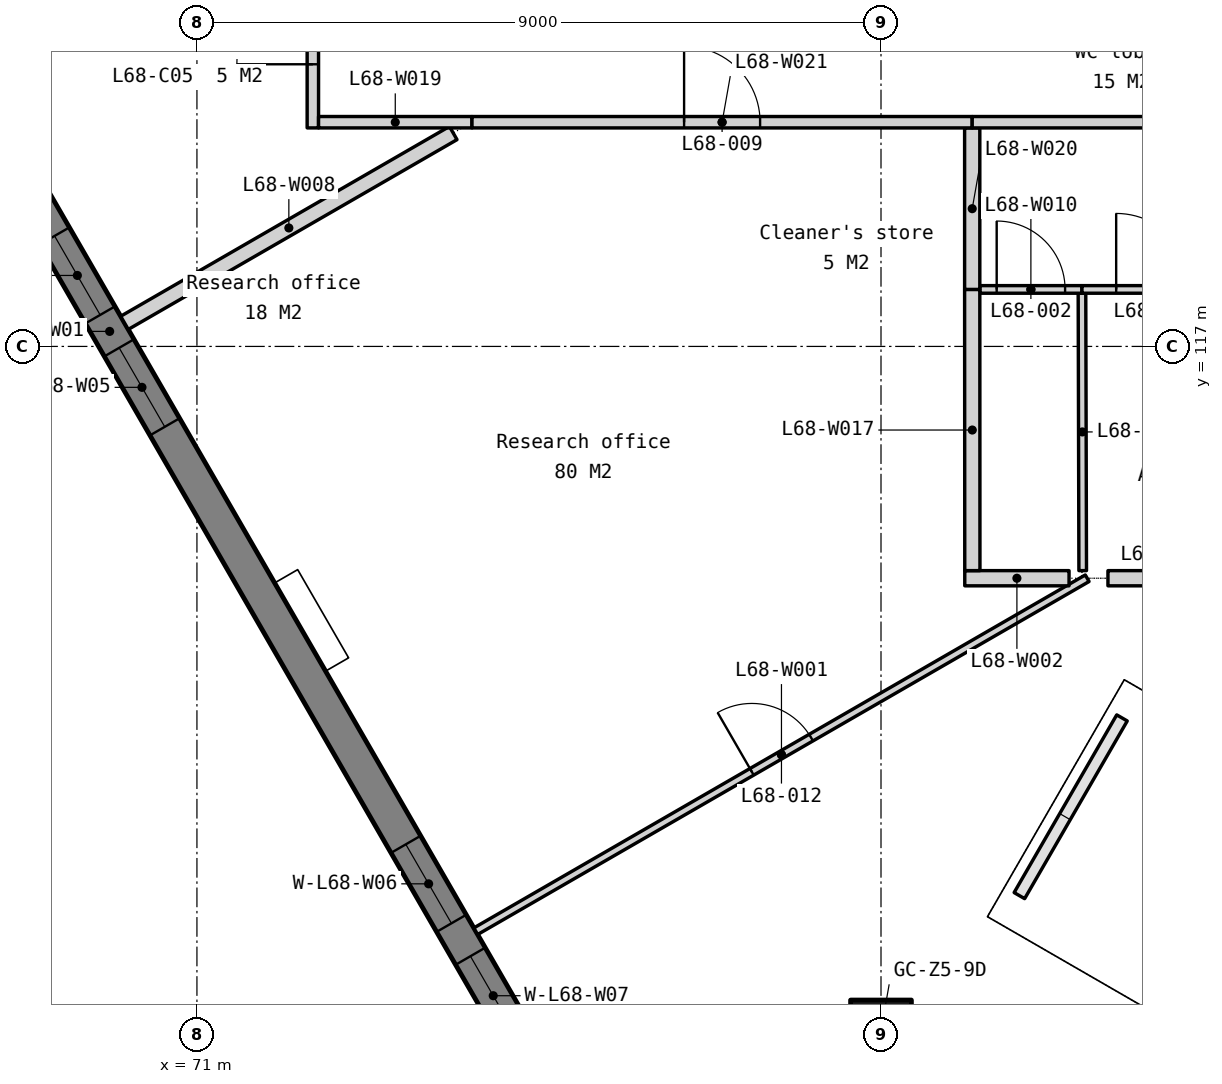
"""IFC4 building model, lengths in metres.
Left out: names, types, materials, properties, quantities, classifications, styles, units other than length and angle.
Written with IfcOpenShell. Run it as: python <this file> out.ifc"""

import sys

from ifc_helpers import new_model, si_unit, direction, frame, frame_2d, origin, origin_2d, place, context, subcontext, project, spatial, polyline, rectangle, outline, extrude, element, fill, save


model = new_model("IFC4")
c1 = context("Model", 3, precision=1e-05, world=origin(), true_north=direction((0.0, 1.0)))
c2 = subcontext(c1, "Body", "Model", "MODEL_VIEW")
j1 = project(units=[si_unit("LENGTHUNIT", "METRE"), si_unit("PLANEANGLEUNIT", "RADIAN")], contexts=[c1])
p1 = place(None, origin())
s1 = spatial("IfcSite", under=j1, at=p1, CompositionType="ELEMENT")
p2 = place(p1, origin())
s2 = spatial("IfcBuilding", under=s1, at=p2, CompositionType="ELEMENT")
p3 = place(p2, frame((0.0, 0.0, 277.7)))
s3 = spatial("IfcBuildingStorey", under=s2, at=p3, CompositionType="ELEMENT", Elevation=277.7)
p4 = place(p3, frame((80.0, 108.0, 0.0), z_axis=(0.0, 0.0, 1.0), x_axis=(1.0, 0.0, 0.0)))
e1 = element("IfcColumn", 1, at=p4, inside=s3, PredefinedType="COLUMN", context=c2, shape_type="SweptSolid", body=[
    extrude(rectangle(XDim=0.8, YDim=0.8, at=origin_2d()), origin(), (0.0, 0.0, 1.0), 3.9),
])
p5 = place(p3, frame((60.609, 133.207, -0.15), z_axis=(0.0, 0.0, 1.0), x_axis=(0.500002536638, -0.866023939251, 0.0)))
e2 = element("IfcWall", 2, at=p5, inside=s3, PredefinedType="SOLIDWALL", context=c2, shape_type="SweptSolid", body=[
    extrude(outline(polyline([(36.972, 0.0), (36.972, 3.9), (0.0, 3.9), (0.0, 0.0), (36.972, 0.0)])), frame((0.0, 0.225, 0.0), z_axis=(0.0, -1.0, 0.0), x_axis=(1.0, 0.0, 0.0)), (0.0, 0.0, 1.0), 0.45),
])
p6 = place(p5, frame((0.744, 0.0, 0.95)))
e3 = element("IfcOpeningElement", 3, at=p6, cuts=e2, PredefinedType="OPENING", context=c2, shape_type="SweptSolid", body=[
    extrude(rectangle(XDim=1.2, YDim=2.2, at=frame_2d((0.6, 1.1))), frame((0.0, 0.235, 0.0), z_axis=(0.0, -1.0, 0.0), x_axis=(1.0, 0.0, 0.0)), (0.0, 0.0, 1.0), 0.47),
])
p7 = place(p5, frame((7.793, 0.0, 0.95)))
e4 = element("IfcOpeningElement", 4, at=p7, cuts=e2, PredefinedType="OPENING", context=c2, shape_type="SweptSolid", body=[
    extrude(rectangle(XDim=1.2, YDim=2.2, at=frame_2d((0.6, 1.1))), frame((0.0, 0.235, 0.0), z_axis=(0.0, -1.0, 0.0), x_axis=(1.0, 0.0, 0.0)), (0.0, 0.0, 1.0), 0.47),
])
p8 = place(p5, frame((9.493, 0.0, 0.95)))
e5 = element("IfcOpeningElement", 5, at=p8, cuts=e2, PredefinedType="OPENING", context=c2, shape_type="SweptSolid", body=[
    extrude(rectangle(XDim=1.2, YDim=2.2, at=frame_2d((0.6, 1.1))), frame((0.0, 0.235, 0.0), z_axis=(0.0, -1.0, 0.0), x_axis=(1.0, 0.0, 0.0)), (0.0, 0.0, 1.0), 0.47),
])
p9 = place(p5, frame((17.036, 0.0, 0.95)))
e6 = element("IfcOpeningElement", 6, at=p9, cuts=e2, PredefinedType="OPENING", context=c2, shape_type="SweptSolid", body=[
    extrude(rectangle(XDim=1.2, YDim=2.2, at=frame_2d((0.6, 1.1))), frame((0.0, 0.235, 0.0), z_axis=(0.0, -1.0, 0.0), x_axis=(1.0, 0.0, 0.0)), (0.0, 0.0, 1.0), 0.47),
])
p10 = place(p5, frame((18.736, 0.0, 0.95)))
e7 = element("IfcOpeningElement", 7, at=p10, cuts=e2, PredefinedType="OPENING", context=c2, shape_type="SweptSolid", body=[
    extrude(rectangle(XDim=1.2, YDim=2.2, at=frame_2d((0.6, 1.1))), frame((0.0, 0.235, 0.0), z_axis=(0.0, -1.0, 0.0), x_axis=(1.0, 0.0, 0.0)), (0.0, 0.0, 1.0), 0.47),
])
p11 = place(p5, frame((26.279, 0.0, 0.95)))
e8 = element("IfcOpeningElement", 8, at=p11, cuts=e2, PredefinedType="OPENING", context=c2, shape_type="SweptSolid", body=[
    extrude(rectangle(XDim=1.2, YDim=2.2, at=frame_2d((0.6, 1.1))), frame((0.0, 0.235, 0.0), z_axis=(0.0, -1.0, 0.0), x_axis=(1.0, 0.0, 0.0)), (0.0, 0.0, 1.0), 0.47),
])
p12 = place(p5, frame((27.979, 0.0, 0.95)))
e9 = element("IfcOpeningElement", 9, at=p12, cuts=e2, PredefinedType="OPENING", context=c2, shape_type="SweptSolid", body=[
    extrude(rectangle(XDim=1.2, YDim=2.2, at=frame_2d((0.6, 1.1))), frame((0.0, 0.235, 0.0), z_axis=(0.0, -1.0, 0.0), x_axis=(1.0, 0.0, 0.0)), (0.0, 0.0, 1.0), 0.47),
])
p13 = place(p5, frame((35.028, 0.0, 0.95)))
e10 = element("IfcOpeningElement", 10, at=p13, cuts=e2, PredefinedType="OPENING", context=c2, shape_type="SweptSolid", body=[
    extrude(rectangle(XDim=1.2, YDim=2.2, at=frame_2d((0.6, 1.1))), frame((0.0, 0.235, 0.0), z_axis=(0.0, -1.0, 0.0), x_axis=(1.0, 0.0, 0.0)), (0.0, 0.0, 1.0), 0.47),
])
p14 = place(p2, frame((0.0, 0.0, 273.8)))
s4 = spatial("IfcBuildingStorey", under=s2, at=p14, CompositionType="ELEMENT", Elevation=273.8)
p15 = place(p14, frame((84.934, 107.717, 0.0), z_axis=(0.0, 0.0, 1.0), x_axis=(-0.866020906874, 0.500007788796, 0.0)))
e11 = element("IfcWall", 11, at=p15, inside=s4, PredefinedType="SOLIDWALL", context=c2, shape_type="SweptSolid", body=[
    extrude(rectangle(XDim=3.95, YDim=0.45, at=frame_2d((1.975, 0.0))), origin(), (0.0, 0.0, 1.0), 7.65),
])
p16 = place(p14, frame((86.509, 110.445, 0.0), z_axis=(0.0, 0.0, 1.0), x_axis=(-0.866047669374, 0.499961432884, 0.0)))
e12 = element("IfcWall", 12, at=p16, inside=s4, PredefinedType="SOLIDWALL", context=c2, shape_type="SweptSolid", body=[
    extrude(rectangle(XDim=3.95, YDim=0.45, at=frame_2d((1.975, 0.0))), origin(), (0.0, 0.0, 1.0), 7.65),
])
p17 = place(p3, frame((74.668, 109.305, 0.0), z_axis=(0.0, 0.0, 1.0), x_axis=(0.866021891294, 0.500006083763, 0.0)))
e13 = element("IfcWall", 13, at=p17, inside=s3, PredefinedType="PARTITIONING", context=c2, shape_type="SweptSolid", body=[
    extrude(rectangle(XDim=9.289, YDim=0.1, at=frame_2d((4.645, 0.0))), origin(), (0.0, 0.0, 1.0), 3.75),
])
p18 = place(p17, frame((4.195, 0.0, 0.0)))
e14 = element("IfcOpeningElement", 14, at=p18, cuts=e13, PredefinedType="OPENING", context=c2, shape_type="SweptSolid", body=[
    extrude(rectangle(XDim=0.9, YDim=2.1, at=frame_2d((0.45, 1.05))), frame((0.0, 0.06, 0.0), z_axis=(0.0, -1.0, 0.0), x_axis=(1.0, 0.0, 0.0)), (0.0, 0.0, 1.0), 0.12),
])
p19 = place(p3, frame((81.102, 113.95, 0.0), z_axis=(0.0, 0.0, 1.0), x_axis=(1.0, 0.0, 0.0)))
e15 = element("IfcWall", 15, at=p19, inside=s3, PredefinedType="PARTITIONING", context=c2, shape_type="SweptSolid", body=[
    extrude(rectangle(XDim=1.372, YDim=0.2, at=frame_2d((0.686, 0.0))), origin(), (0.0, 0.0, 1.0), 3.75),
])
p20 = place(p3, frame((82.986, 113.95, 0.0), z_axis=(0.0, 0.0, 1.0), x_axis=(1.0, 0.0, 0.0)))
e16 = element("IfcWall", 16, at=p20, inside=s3, PredefinedType="PARTITIONING", context=c2, shape_type="SweptSolid", body=[
    extrude(rectangle(XDim=1.548, YDim=0.2, at=frame_2d((0.774, 0.0))), origin(), (0.0, 0.0, 1.0), 3.75),
])
p21 = place(p3, frame((70.047, 117.31, 0.0), z_axis=(0.0, 0.0, 1.0), x_axis=(0.866032544947, 0.499987630939, 0.0)))
e17 = element("IfcWall", 17, at=p21, inside=s3, PredefinedType="PARTITIONING", context=c2, shape_type="SweptSolid", body=[
    extrude(rectangle(XDim=4.994, YDim=0.2, at=frame_2d((2.497, 0.0))), origin(), (0.0, 0.0, 1.0), 3.75),
])
p22 = place(p3, frame((82.654, 114.05, 0.0), z_axis=(0.0, 0.0, 1.0), x_axis=(-0.002675575707, 0.999996420641, 0.0)))
e18 = element("IfcWall", 18, at=p22, inside=s3, PredefinedType="PARTITIONING", context=c2, shape_type="SweptSolid", body=[
    extrude(rectangle(XDim=3.65, YDim=0.1, at=frame_2d((1.825, 0.0))), origin(), (0.0, 0.0, 1.0), 3.75),
])
p23 = place(p3, frame((81.3, 117.75, 0.0), z_axis=(0.0, 0.0, 1.0), x_axis=(1.0, 0.0, 0.0)))
e19 = element("IfcWall", 19, at=p23, inside=s3, PredefinedType="PARTITIONING", context=c2, shape_type="SweptSolid", body=[
    extrude(rectangle(XDim=1.344, YDim=0.1, at=frame_2d((0.672, 0.0))), origin(), (0.0, 0.0, 1.0), 3.75),
])
p24 = place(p23, frame((0.222, 0.0, 0.0)))
e20 = element("IfcOpeningElement", 20, at=p24, cuts=e19, PredefinedType="OPENING", context=c2, shape_type="SweptSolid", body=[
    extrude(rectangle(XDim=0.9, YDim=2.1, at=frame_2d((0.45, 1.05))), frame((0.0, 0.06, 0.0), z_axis=(0.0, -1.0, 0.0), x_axis=(1.0, 0.0, 0.0)), (0.0, 0.0, 1.0), 0.12),
])
p25 = place(p3, frame((82.644, 117.75, 0.0), z_axis=(0.0, 0.0, 1.0), x_axis=(1.0, 0.0, 0.0)))
e21 = element("IfcWall", 21, at=p25, inside=s3, PredefinedType="PARTITIONING", context=c2, shape_type="SweptSolid", body=[
    extrude(rectangle(XDim=1.9, YDim=0.1, at=frame_2d((0.95, 0.0))), origin(), (0.0, 0.0, 1.0), 3.75),
])
p26 = place(p25, frame((0.45, 0.0, 0.0)))
e22 = element("IfcOpeningElement", 22, at=p26, cuts=e21, PredefinedType="OPENING", context=c2, shape_type="SweptSolid", body=[
    extrude(rectangle(XDim=1.0, YDim=2.1, at=frame_2d((0.5, 1.05))), frame((0.0, 0.06, 0.0), z_axis=(0.0, -1.0, 0.0), x_axis=(1.0, 0.0, 0.0)), (0.0, 0.0, 1.0), 0.12),
])
p27 = place(p3, frame((81.2, 117.75, 0.0), z_axis=(0.0, 0.0, 1.0), x_axis=(0.000527878514, -0.999999860672, 0.0)))
e23 = element("IfcWall", 23, at=p27, inside=s3, PredefinedType="PARTITIONING", context=c2, shape_type="SweptSolid", body=[
    extrude(rectangle(XDim=3.7, YDim=0.2, at=frame_2d((1.85, 0.0))), origin(), (0.0, 0.0, 1.0), 3.75),
])
p28 = place(p3, frame((72.525, 119.875, 0.0), z_axis=(0.0, 0.0, 1.0), x_axis=(0.0, 1.0, 0.0)))
e24 = element("IfcWall", 24, at=p28, inside=s3, PredefinedType="PARTITIONING", context=c2, shape_type="SweptSolid", body=[
    extrude(rectangle(XDim=2.675, YDim=0.15, at=frame_2d((1.337, 0.0))), origin(), (0.0, 0.0, 1.0), 3.75),
])
p29 = place(p28, frame((0.837, 0.0, 0.0)))
e25 = element("IfcOpeningElement", 25, at=p29, cuts=e24, PredefinedType="OPENING", context=c2, shape_type="SweptSolid", body=[
    extrude(rectangle(XDim=1.0, YDim=2.1, at=frame_2d((0.5, 1.05))), frame((0.0, 0.085, 0.0), z_axis=(0.0, -1.0, 0.0), x_axis=(1.0, 0.0, 0.0)), (0.0, 0.0, 1.0), 0.17),
])
p30 = place(p3, frame((72.6, 119.95, 0.0), z_axis=(0.0, 0.0, 1.0), x_axis=(1.0, 0.0, 0.0)))
e26 = element("IfcWall", 26, at=p30, inside=s3, PredefinedType="PARTITIONING", context=c2, shape_type="SweptSolid", body=[
    extrude(rectangle(XDim=2.019, YDim=0.15, at=frame_2d((1.009, 0.0))), origin(), (0.0, 0.0, 1.0), 3.75),
])
p31 = place(p3, frame((81.2, 117.75, 0.0), z_axis=(0.0, 0.0, 1.0), x_axis=(0.0, 1.0, 0.0)))
e27 = element("IfcWall", 27, at=p31, inside=s3, PredefinedType="PARTITIONING", context=c2, shape_type="SweptSolid", body=[
    extrude(rectangle(XDim=2.125, YDim=0.2, at=frame_2d((1.062, 0.0))), origin(), (0.0, 0.0, 1.0), 3.75),
])
p32 = place(p3, frame((74.619, 119.95, 0.0), z_axis=(0.0, 0.0, 1.0), x_axis=(1.0, 0.0, 0.0)))
e28 = element("IfcWall", 28, at=p32, inside=s3, PredefinedType="PARTITIONING", context=c2, shape_type="SweptSolid", body=[
    extrude(rectangle(XDim=6.581, YDim=0.15, at=frame_2d((3.291, 0.0))), origin(), (0.0, 0.0, 1.0), 3.75),
])
p33 = place(p32, frame((2.791, 0.0, 0.0)))
e29 = element("IfcOpeningElement", 29, at=p33, cuts=e28, PredefinedType="OPENING", context=c2, shape_type="SweptSolid", body=[
    extrude(rectangle(XDim=1.0, YDim=2.1, at=frame_2d((0.5, 1.05))), frame((0.0, 0.085, 0.0), z_axis=(0.0, -1.0, 0.0), x_axis=(1.0, 0.0, 0.0)), (0.0, 0.0, 1.0), 0.17),
])
p34 = place(p3, frame((81.2, 119.95, 0.0), z_axis=(0.0, 0.0, 1.0), x_axis=(1.0, 0.0, 0.0)))
e30 = element("IfcWall", 30, at=p34, inside=s3, PredefinedType="PARTITIONING", context=c2, shape_type="SweptSolid", body=[
    extrude(rectangle(XDim=6.275, YDim=0.15, at=frame_2d((3.137, 0.0))), origin(), (0.0, 0.0, 1.0), 3.75),
])
p35 = place(p34, frame((2.637, 0.0, 0.0)))
e31 = element("IfcOpeningElement", 31, at=p35, cuts=e30, PredefinedType="OPENING", context=c2, shape_type="SweptSolid", body=[
    extrude(rectangle(XDim=1.0, YDim=2.1, at=frame_2d((0.5, 1.05))), frame((0.0, 0.085, 0.0), z_axis=(0.0, -1.0, 0.0), x_axis=(1.0, 0.0, 0.0)), (0.0, 0.0, 1.0), 0.17),
])
p36 = place(p9, origin())
e32 = element("IfcWindow", 32, at=p36, inside=s3, PartitioningType="SINGLE_PANEL", PredefinedType="WINDOW", context=c2, shape_type="SweptSolid", body=[
    extrude(rectangle(XDim=1.2, YDim=2.2, at=frame_2d((0.6, 1.1))), frame((0.0, 0.03, 0.0), z_axis=(0.0, -1.0, 0.0), x_axis=(1.0, 0.0, 0.0)), (0.0, 0.0, 1.0), 0.06),
])
fill(e6, e32)
p37 = place(p10, origin())
e33 = element("IfcWindow", 33, at=p37, inside=s3, PartitioningType="SINGLE_PANEL", PredefinedType="WINDOW", context=c2, shape_type="SweptSolid", body=[
    extrude(rectangle(XDim=1.2, YDim=2.2, at=frame_2d((0.6, 1.1))), frame((0.0, 0.03, 0.0), z_axis=(0.0, -1.0, 0.0), x_axis=(1.0, 0.0, 0.0)), (0.0, 0.0, 1.0), 0.06),
])
fill(e7, e33)
p38 = place(p11, origin())
e34 = element("IfcWindow", 34, at=p38, inside=s3, PartitioningType="SINGLE_PANEL", PredefinedType="WINDOW", context=c2, shape_type="SweptSolid", body=[
    extrude(rectangle(XDim=1.2, YDim=2.2, at=frame_2d((0.6, 1.1))), frame((0.0, 0.03, 0.0), z_axis=(0.0, -1.0, 0.0), x_axis=(1.0, 0.0, 0.0)), (0.0, 0.0, 1.0), 0.06),
])
fill(e8, e34)
p39 = place(p12, origin())
e35 = element("IfcWindow", 35, at=p39, inside=s3, PartitioningType="SINGLE_PANEL", PredefinedType="WINDOW", context=c2, shape_type="SweptSolid", body=[
    extrude(rectangle(XDim=1.2, YDim=2.2, at=frame_2d((0.6, 1.1))), frame((0.0, 0.03, 0.0), z_axis=(0.0, -1.0, 0.0), x_axis=(1.0, 0.0, 0.0)), (0.0, 0.0, 1.0), 0.06),
])
fill(e9, e35)
p40 = place(p24, origin())
e36 = element("IfcDoor", 36, at=p40, inside=s3, OperationType="SINGLE_SWING_LEFT", PredefinedType="DOOR", context=c2, shape_type="SweptSolid", body=[
    extrude(rectangle(XDim=0.9, YDim=2.1, at=frame_2d((0.45, 1.05))), frame((0.0, 0.025, 0.0), z_axis=(0.0, -1.0, 0.0), x_axis=(1.0, 0.0, 0.0)), (0.0, 0.0, 1.0), 0.05),
])
fill(e20, e36)
p41 = place(p26, origin())
e37 = element("IfcDoor", 37, at=p41, inside=s3, OperationType="SINGLE_SWING_LEFT", PredefinedType="DOOR", context=c2, shape_type="SweptSolid", body=[
    extrude(rectangle(XDim=1.0, YDim=2.1, at=frame_2d((0.5, 1.05))), frame((0.0, 0.025, 0.0), z_axis=(0.0, -1.0, 0.0), x_axis=(1.0, 0.0, 0.0)), (0.0, 0.0, 1.0), 0.05),
])
fill(e22, e37)
p42 = place(p29, origin())
e38 = element("IfcDoor", 38, at=p42, inside=s3, OperationType="SINGLE_SWING_LEFT", PredefinedType="DOOR", context=c2, shape_type="SweptSolid", body=[
    extrude(rectangle(XDim=1.0, YDim=2.1, at=frame_2d((0.5, 1.05))), frame((0.0, 0.025, 0.0), z_axis=(0.0, -1.0, 0.0), x_axis=(1.0, 0.0, 0.0)), (0.0, 0.0, 1.0), 0.05),
])
fill(e25, e38)
p43 = place(p33, origin())
e39 = element("IfcDoor", 39, at=p43, inside=s3, OperationType="SINGLE_SWING_LEFT", PredefinedType="DOOR", context=c2, shape_type="SweptSolid", body=[
    extrude(rectangle(XDim=1.0, YDim=2.1, at=frame_2d((0.5, 1.05))), frame((0.0, 0.025, 0.0), z_axis=(0.0, -1.0, 0.0), x_axis=(1.0, 0.0, 0.0)), (0.0, 0.0, 1.0), 0.05),
])
fill(e29, e39)
p44 = place(p18, origin())
e40 = element("IfcDoor", 40, at=p44, inside=s3, OperationType="SINGLE_SWING_LEFT", PredefinedType="DOOR", context=c2, shape_type="SweptSolid", body=[
    extrude(rectangle(XDim=0.9, YDim=2.1, at=frame_2d((0.45, 1.05))), frame((0.0, 0.025, 0.0), z_axis=(0.0, -1.0, 0.0), x_axis=(1.0, 0.0, 0.0)), (0.0, 0.0, 1.0), 0.05),
])
fill(e14, e40)
save(model, sys.argv[1])
